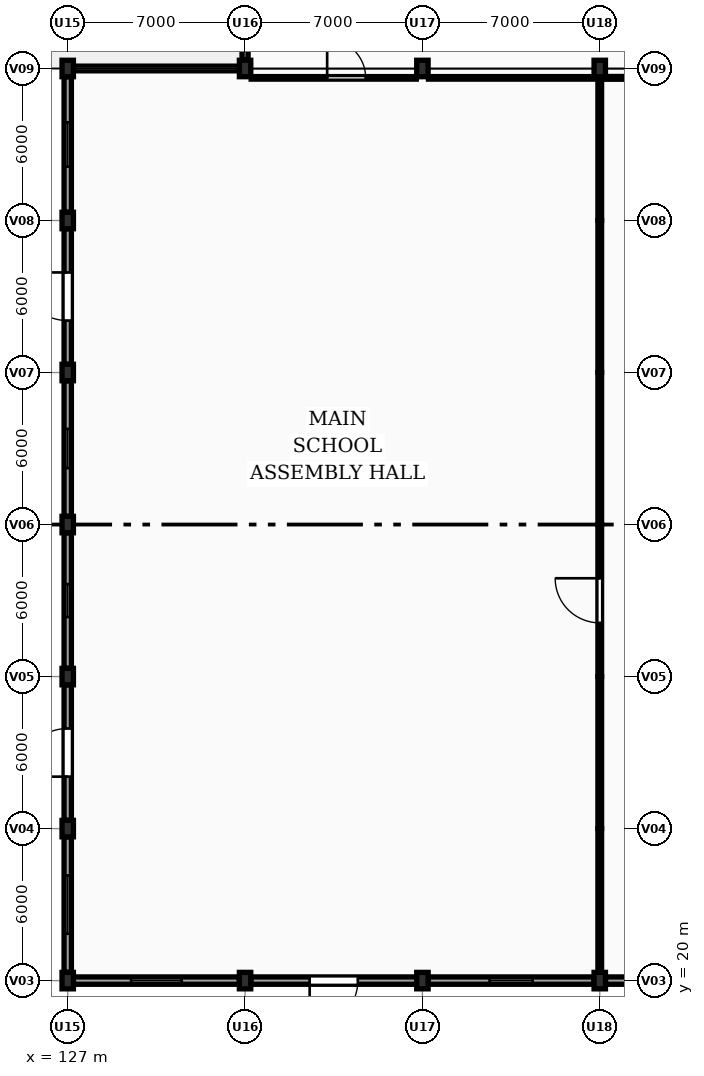
"""IFC4 building model, lengths in metres.
Left out: names, types, materials, properties, quantities, classifications, styles, units other than length and angle.
Written with IfcOpenShell. Run it as: python <this file> out.ifc"""

import sys

from ifc_helpers import new_model, si_unit, direction, frame, frame_2d, origin, origin_2d, place, context, subcontext, project, spatial, rectangle, extrude, element, fill, save


model = new_model("IFC4")
c1 = context("Model", 3, precision=1e-05, world=origin(), true_north=direction((0.0, 1.0)))
c2 = subcontext(c1, "Body", "Model", "MODEL_VIEW")
j1 = project(units=[si_unit("LENGTHUNIT", "METRE"), si_unit("PLANEANGLEUNIT", "RADIAN")], contexts=[c1])
p1 = place(None, origin())
s1 = spatial("IfcSite", under=j1, at=p1, CompositionType="ELEMENT")
p2 = place(p1, origin())
s2 = spatial("IfcBuilding", under=s1, at=p2, CompositionType="ELEMENT")
p3 = place(p2, origin())
s3 = spatial("IfcBuildingStorey", under=s2, at=p3, CompositionType="ELEMENT", Elevation=0.0)
for number, where, z_axis, x_axis in (
    (1, (127.0, 20.0, -0.2), (0.0, 0.0, 1.0), (1.0, 0.0, 0.0)),
    (2, (127.0, 26.0, -0.2), (0.0, 0.0, 1.0), (1.0, 0.0, 0.0)),
    (3, (127.0, 32.0, -0.2), (0.0, 0.0, 1.0), (1.0, 0.0, 0.0)),
    (4, (127.0, 38.0, -0.2), (0.0, 0.0, 1.0), (1.0, 0.0, 0.0)),
    (5, (127.0, 44.0, -0.2), (0.0, 0.0, 1.0), (1.0, 0.0, 0.0)),
    (6, (127.0, 50.0, -0.2), (0.0, 0.0, 1.0), (1.0, 0.0, 0.0)),
    (7, (127.0, 56.0, -0.2), (0.0, 0.0, 1.0), (1.0, 0.0, 0.0)),
    (8, (134.0, 20.0, -0.2), (0.0, 0.0, 1.0), (1.0, 0.0, 0.0)),
    (9, (134.0, 56.0, -0.2), (0.0, 0.0, 1.0), (1.0, 0.0, 0.0)),
    (10, (141.0, 20.0, -0.2), (0.0, 0.0, 1.0), (1.0, 0.0, 0.0)),
    (11, (141.0, 56.0, -0.2), (0.0, 0.0, 1.0), (1.0, 0.0, 0.0)),
    (12, (148.0, 20.0, -0.2), (0.0, 0.0, 1.0), (1.0, 0.0, 0.0)),
    (13, (148.0, 56.0, -0.2), (0.0, 0.0, 1.0), (1.0, 0.0, 0.0)),
):
    element("IfcColumn", number, at=place(p3, frame(where, z_axis=z_axis, x_axis=x_axis)), inside=s3, PredefinedType="COLUMN", context=c2, shape_type="SweptSolid", body=[
        extrude(rectangle(XDim=0.45, YDim=0.65, at=origin_2d()), origin(), (0.0, 0.0, 1.0), 4.7),
    ])
p4 = place(p3, frame((154.775, 20.0, 0.0), z_axis=(0.0, 0.0, 1.0), x_axis=(-1.0, 0.0, 0.0)))
e14 = element("IfcWall", 14, at=p4, inside=s3, PredefinedType="SOLIDWALL", context=c2, shape_type="SweptSolid", body=[
    extrude(rectangle(XDim=6.55, YDim=0.29, at=frame_2d((3.275, 0.0))), origin(), (0.0, 0.0, 1.0), 3.54),
])
p5 = place(p4, frame((2.575, 0.0, 0.95)))
e15 = element("IfcOpeningElement", 15, at=p5, cuts=e14, PredefinedType="OPENING", context=c2, shape_type="SweptSolid", body=[
    extrude(rectangle(XDim=1.4, YDim=1.8, at=frame_2d((0.7, 0.9))), frame((0.0, 0.155, 0.0), z_axis=(0.0, -1.0, 0.0), x_axis=(1.0, 0.0, 0.0)), (0.0, 0.0, 1.0), 0.31),
])
p6 = place(p3, frame((147.775, 20.0, 0.0), z_axis=(0.0, 0.0, 1.0), x_axis=(-1.0, 0.0, 0.0)))
e16 = element("IfcWall", 16, at=p6, inside=s3, PredefinedType="SOLIDWALL", context=c2, shape_type="SweptSolid", body=[
    extrude(rectangle(XDim=6.55, YDim=0.29, at=frame_2d((3.275, 0.0))), origin(), (0.0, 0.0, 1.0), 3.54),
])
p7 = place(p6, frame((2.425, 0.0, 0.95)))
e17 = element("IfcOpeningElement", 17, at=p7, cuts=e16, PredefinedType="OPENING", context=c2, shape_type="SweptSolid", body=[
    extrude(rectangle(XDim=1.7, YDim=1.8, at=frame_2d((0.85, 0.9))), frame((0.0, 0.155, 0.0), z_axis=(0.0, -1.0, 0.0), x_axis=(1.0, 0.0, 0.0)), (0.0, 0.0, 1.0), 0.31),
])
p8 = place(p3, frame((140.775, 20.0, 0.0), z_axis=(0.0, 0.0, 1.0), x_axis=(-1.0, 0.0, 0.0)))
e18 = element("IfcWall", 18, at=p8, inside=s3, PredefinedType="SOLIDWALL", context=c2, shape_type="SweptSolid", body=[
    extrude(rectangle(XDim=6.55, YDim=0.29, at=frame_2d((3.275, 0.0))), origin(), (0.0, 0.0, 1.0), 3.54),
])
p9 = place(p8, frame((2.325, 0.0, 0.0)))
e19 = element("IfcOpeningElement", 19, at=p9, cuts=e18, PredefinedType="OPENING", context=c2, shape_type="SweptSolid", body=[
    extrude(rectangle(XDim=1.9, YDim=2.25, at=frame_2d((0.95, 1.125))), frame((0.0, 0.155, 0.0), z_axis=(0.0, -1.0, 0.0), x_axis=(1.0, 0.0, 0.0)), (0.0, 0.0, 1.0), 0.31),
])
p10 = place(p3, frame((133.775, 20.0, 0.0), z_axis=(0.0, 0.0, 1.0), x_axis=(-1.0, 0.0, 0.0)))
e20 = element("IfcWall", 20, at=p10, inside=s3, PredefinedType="SOLIDWALL", context=c2, shape_type="SweptSolid", body=[
    extrude(rectangle(XDim=6.55, YDim=0.29, at=frame_2d((3.275, 0.0))), origin(), (0.0, 0.0, 1.0), 3.54),
])
p11 = place(p10, frame((2.275, 0.0, 0.95)))
e21 = element("IfcOpeningElement", 21, at=p11, cuts=e20, PredefinedType="OPENING", context=c2, shape_type="SweptSolid", body=[
    extrude(rectangle(XDim=2.0, YDim=1.8, at=frame_2d((1.0, 0.9))), frame((0.0, 0.155, 0.0), z_axis=(0.0, -1.0, 0.0), x_axis=(1.0, 0.0, 0.0)), (0.0, 0.0, 1.0), 0.31),
])
p12 = place(p3, frame((127.0, 20.325, 0.0), z_axis=(0.0, 0.0, 1.0), x_axis=(0.0, 1.0, 0.0)))
e22 = element("IfcWall", 22, at=p12, inside=s3, PredefinedType="SOLIDWALL", context=c2, shape_type="SweptSolid", body=[
    extrude(rectangle(XDim=5.35, YDim=0.29, at=frame_2d((2.675, 0.0))), origin(), (0.0, 0.0, 1.0), 3.54),
])
p13 = place(p12, frame((1.525, 0.0, 0.95)))
e23 = element("IfcOpeningElement", 23, at=p13, cuts=e22, PredefinedType="OPENING", context=c2, shape_type="SweptSolid", body=[
    extrude(rectangle(XDim=2.3, YDim=1.8, at=frame_2d((1.15, 0.9))), frame((0.0, 0.155, 0.0), z_axis=(0.0, -1.0, 0.0), x_axis=(1.0, 0.0, 0.0)), (0.0, 0.0, 1.0), 0.31),
])
p14 = place(p3, frame((127.0, 26.325, 0.0), z_axis=(0.0, 0.0, 1.0), x_axis=(0.0, 1.0, 0.0)))
e24 = element("IfcWall", 24, at=p14, inside=s3, PredefinedType="SOLIDWALL", context=c2, shape_type="SweptSolid", body=[
    extrude(rectangle(XDim=5.35, YDim=0.29, at=frame_2d((2.675, 0.0))), origin(), (0.0, 0.0, 1.0), 3.54),
])
p15 = place(p14, frame((1.725, 0.0, 0.0)))
e25 = element("IfcOpeningElement", 25, at=p15, cuts=e24, PredefinedType="OPENING", context=c2, shape_type="SweptSolid", body=[
    extrude(rectangle(XDim=1.9, YDim=2.25, at=frame_2d((0.95, 1.125))), frame((0.0, 0.155, 0.0), z_axis=(0.0, -1.0, 0.0), x_axis=(1.0, 0.0, 0.0)), (0.0, 0.0, 1.0), 0.31),
])
p16 = place(p3, frame((127.0, 32.325, 0.0), z_axis=(0.0, 0.0, 1.0), x_axis=(0.0, 1.0, 0.0)))
e26 = element("IfcWall", 26, at=p16, inside=s3, PredefinedType="SOLIDWALL", context=c2, shape_type="SweptSolid", body=[
    extrude(rectangle(XDim=5.35, YDim=0.29, at=frame_2d((2.675, 0.0))), origin(), (0.0, 0.0, 1.0), 3.54),
])
p17 = place(p16, frame((2.025, 0.0, 0.95)))
e27 = element("IfcOpeningElement", 27, at=p17, cuts=e26, PredefinedType="OPENING", context=c2, shape_type="SweptSolid", body=[
    extrude(rectangle(XDim=1.3, YDim=1.4, at=frame_2d((0.65, 0.7))), frame((0.0, 0.155, 0.0), z_axis=(0.0, -1.0, 0.0), x_axis=(1.0, 0.0, 0.0)), (0.0, 0.0, 1.0), 0.31),
])
p18 = place(p3, frame((127.0, 38.325, 0.0), z_axis=(0.0, 0.0, 1.0), x_axis=(0.0, 1.0, 0.0)))
e28 = element("IfcWall", 28, at=p18, inside=s3, PredefinedType="SOLIDWALL", context=c2, shape_type="SweptSolid", body=[
    extrude(rectangle(XDim=5.35, YDim=0.29, at=frame_2d((2.675, 0.0))), origin(), (0.0, 0.0, 1.0), 3.54),
])
p19 = place(p18, frame((1.9, 0.0, 0.95)))
e29 = element("IfcOpeningElement", 29, at=p19, cuts=e28, PredefinedType="OPENING", context=c2, shape_type="SweptSolid", body=[
    extrude(rectangle(XDim=1.55, YDim=1.4, at=frame_2d((0.775, 0.7))), frame((0.0, 0.155, 0.0), z_axis=(0.0, -1.0, 0.0), x_axis=(1.0, 0.0, 0.0)), (0.0, 0.0, 1.0), 0.31),
])
p20 = place(p3, frame((127.0, 44.325, 0.0), z_axis=(0.0, 0.0, 1.0), x_axis=(0.0, 1.0, 0.0)))
e30 = element("IfcWall", 30, at=p20, inside=s3, PredefinedType="SOLIDWALL", context=c2, shape_type="SweptSolid", body=[
    extrude(rectangle(XDim=5.35, YDim=0.29, at=frame_2d((2.675, 0.0))), origin(), (0.0, 0.0, 1.0), 3.54),
])
p21 = place(p20, frame((1.725, 0.0, 0.0)))
e31 = element("IfcOpeningElement", 31, at=p21, cuts=e30, PredefinedType="OPENING", context=c2, shape_type="SweptSolid", body=[
    extrude(rectangle(XDim=1.9, YDim=2.25, at=frame_2d((0.95, 1.125))), frame((0.0, 0.155, 0.0), z_axis=(0.0, -1.0, 0.0), x_axis=(1.0, 0.0, 0.0)), (0.0, 0.0, 1.0), 0.31),
])
p22 = place(p3, frame((127.0, 50.325, 0.0), z_axis=(0.0, 0.0, 1.0), x_axis=(0.0, 1.0, 0.0)))
e32 = element("IfcWall", 32, at=p22, inside=s3, PredefinedType="SOLIDWALL", context=c2, shape_type="SweptSolid", body=[
    extrude(rectangle(XDim=5.35, YDim=0.29, at=frame_2d((2.675, 0.0))), origin(), (0.0, 0.0, 1.0), 3.54),
])
p23 = place(p22, frame((1.8, 0.0, 0.95)))
e33 = element("IfcOpeningElement", 33, at=p23, cuts=e32, PredefinedType="OPENING", context=c2, shape_type="SweptSolid", body=[
    extrude(rectangle(XDim=1.75, YDim=1.4, at=frame_2d((0.875, 0.7))), frame((0.0, 0.155, 0.0), z_axis=(0.0, -1.0, 0.0), x_axis=(1.0, 0.0, 0.0)), (0.0, 0.0, 1.0), 0.31),
])
p24 = place(p3, frame((127.225, 56.0, 0.0), z_axis=(0.0, 0.0, 1.0), x_axis=(1.0, 0.0, 0.0)))
e34 = element("IfcWall", 34, at=p24, inside=s3, PredefinedType="SOLIDWALL", context=c2, shape_type="SweptSolid", body=[
    extrude(rectangle(XDim=6.55, YDim=0.185, at=frame_2d((3.275, 0.0))), origin(), (0.0, 0.0, 1.0), 0.95),
])
p25 = place(p3, frame((134.0, 56.325, 0.0), z_axis=(0.0, 0.0, 1.0), x_axis=(0.0, 1.0, 0.0)))
e35 = element("IfcWall", 35, at=p25, inside=s3, PredefinedType="SOLIDWALL", context=c2, shape_type="SweptSolid", body=[
    extrude(rectangle(XDim=7.425, YDim=0.24, at=frame_2d((3.712, 0.0))), origin(), (0.0, 0.0, 1.0), 3.565),
])
p26 = place(p25, frame((2.812, 0.0, 0.0)))
e36 = element("IfcOpeningElement", 36, at=p26, cuts=e35, PredefinedType="OPENING", context=c2, shape_type="SweptSolid", body=[
    extrude(rectangle(XDim=1.8, YDim=2.2, at=frame_2d((0.9, 1.1))), frame((0.0, 0.13, 0.0), z_axis=(0.0, -1.0, 0.0), x_axis=(1.0, 0.0, 0.0)), (0.0, 0.0, 1.0), 0.26),
])
p27 = place(p3, frame((148.0, 20.34, 0.0), z_axis=(0.0, 0.0, 1.0), x_axis=(0.0, 1.0, 0.0)))
e37 = element("IfcWall", 37, at=p27, inside=s3, PredefinedType="MOVABLE", context=c2, shape_type="SweptSolid", body=[
    extrude(rectangle(XDim=5.66, YDim=0.145, at=frame_2d((2.83, 0.0))), origin(), (0.0, 0.0, 1.0), 8.8),
])
p28 = place(p3, frame((148.0, 26.0, 0.0), z_axis=(0.0, 0.0, 1.0), x_axis=(0.0, 1.0, 0.0)))
e38 = element("IfcWall", 38, at=p28, inside=s3, PredefinedType="MOVABLE", context=c2, shape_type="SweptSolid", body=[
    extrude(rectangle(XDim=6.0, YDim=0.145, at=frame_2d((3.0, 0.0))), origin(), (0.0, 0.0, 1.0), 8.8),
])
p29 = place(p3, frame((148.0, 32.0, 0.0), z_axis=(0.0, 0.0, 1.0), x_axis=(0.0, 1.0, 0.0)))
e39 = element("IfcWall", 39, at=p29, inside=s3, PredefinedType="MOVABLE", context=c2, shape_type="SweptSolid", body=[
    extrude(rectangle(XDim=6.0, YDim=0.145, at=frame_2d((3.0, 0.0))), origin(), (0.0, 0.0, 1.0), 8.8),
])
p30 = place(p29, frame((2.12, 0.0, 0.0)))
e40 = element("IfcOpeningElement", 40, at=p30, cuts=e39, PredefinedType="OPENING", context=c2, shape_type="SweptSolid", body=[
    extrude(rectangle(XDim=1.76, YDim=2.2, at=frame_2d((0.88, 1.1))), frame((0.0, 0.083, 0.0), z_axis=(0.0, -1.0, 0.0), x_axis=(1.0, 0.0, 0.0)), (0.0, 0.0, 1.0), 0.165),
])
for number, where, z_axis, x_axis in (
    (41, (148.0, 38.0, 0.0), (0.0, 0.0, 1.0), (0.0, 1.0, 0.0)),
    (42, (148.0, 44.0, 0.0), (0.0, 0.0, 1.0), (0.0, 1.0, 0.0)),
):
    element("IfcWall", number, at=place(p3, frame(where, z_axis=z_axis, x_axis=x_axis)), inside=s3, PredefinedType="MOVABLE", context=c2, shape_type="SweptSolid", body=[
        extrude(rectangle(XDim=6.0, YDim=0.145, at=frame_2d((3.0, 0.0))), origin(), (0.0, 0.0, 1.0), 8.8),
    ])
p31 = place(p3, frame((148.0, 50.0, 0.0), z_axis=(0.0, 0.0, 1.0), x_axis=(0.0, 1.0, 0.0)))
e43 = element("IfcWall", 43, at=p31, inside=s3, PredefinedType="MOVABLE", context=c2, shape_type="SweptSolid", body=[
    extrude(rectangle(XDim=5.66, YDim=0.145, at=frame_2d((2.83, 0.0))), origin(), (0.0, 0.0, 1.0), 8.8),
])
p32 = place(p3, frame((134.24, 55.63, 0.0), z_axis=(0.0, 0.0, 1.0), x_axis=(1.0, 0.0, 0.0)))
e44 = element("IfcWall", 44, at=p32, inside=s3, PredefinedType="PARTITIONING", context=c2, shape_type="SweptSolid", body=[
    extrude(rectangle(XDim=6.52, YDim=0.1, at=frame_2d((3.26, 0.0))), origin(), (0.0, 0.0, 1.0), 3.565),
])
p33 = place(p32, frame((3.0, 0.0, 0.0)))
e45 = element("IfcOpeningElement", 45, at=p33, cuts=e44, PredefinedType="OPENING", context=c2, shape_type="SweptSolid", body=[
    extrude(rectangle(XDim=1.52, YDim=2.2, at=frame_2d((0.76, 1.1))), frame((0.0, 0.06, 0.0), z_axis=(0.0, -1.0, 0.0), x_axis=(1.0, 0.0, 0.0)), (0.0, 0.0, 1.0), 0.12),
])
p34 = place(p3, frame((141.24, 55.63, 0.0), z_axis=(0.0, 0.0, 1.0), x_axis=(1.0, 0.0, 0.0)))
e46 = element("IfcWall", 46, at=p34, inside=s3, PredefinedType="PARTITIONING", context=c2, shape_type="SweptSolid", body=[
    extrude(rectangle(XDim=6.52, YDim=0.1, at=frame_2d((3.26, 0.0))), origin(), (0.0, 0.0, 1.0), 3.565),
])
p35 = place(p3, frame((148.24, 55.63, 0.0), z_axis=(0.0, 0.0, 1.0), x_axis=(1.0, 0.0, 0.0)))
e47 = element("IfcWall", 47, at=p35, inside=s3, PredefinedType="PARTITIONING", context=c2, shape_type="SweptSolid", body=[
    extrude(rectangle(XDim=6.52, YDim=0.11, at=frame_2d((3.26, 0.0))), origin(), (0.0, 0.0, 1.0), 3.565),
])
p36 = place(p7, origin())
e48 = element("IfcWindow", 48, at=p36, inside=s3, PartitioningType="DOUBLE_PANEL_VERTICAL", PredefinedType="WINDOW", context=c2, shape_type="SweptSolid", body=[
    extrude(rectangle(XDim=1.7, YDim=1.8, at=frame_2d((0.85, 0.9))), frame((0.0, 0.03, 0.0), z_axis=(0.0, -1.0, 0.0), x_axis=(1.0, 0.0, 0.0)), (0.0, 0.0, 1.0), 0.06),
])
fill(e17, e48)
p37 = place(p9, origin())
e49 = element("IfcDoor", 49, at=p37, inside=s3, OperationType="SINGLE_SWING_RIGHT", PredefinedType="DOOR", context=c2, shape_type="SweptSolid", body=[
    extrude(rectangle(XDim=1.9, YDim=2.25, at=frame_2d((0.95, 1.125))), frame((0.0, 0.025, 0.0), z_axis=(0.0, -1.0, 0.0), x_axis=(1.0, 0.0, 0.0)), (0.0, 0.0, 1.0), 0.05),
])
fill(e19, e49)
p38 = place(p11, origin())
e50 = element("IfcWindow", 50, at=p38, inside=s3, PartitioningType="DOUBLE_PANEL_VERTICAL", PredefinedType="WINDOW", context=c2, shape_type="SweptSolid", body=[
    extrude(rectangle(XDim=2.0, YDim=1.8, at=frame_2d((1.0, 0.9))), frame((0.0, 0.03, 0.0), z_axis=(0.0, -1.0, 0.0), x_axis=(1.0, 0.0, 0.0)), (0.0, 0.0, 1.0), 0.06),
])
fill(e21, e50)
p39 = place(p13, origin())
e51 = element("IfcWindow", 51, at=p39, inside=s3, PartitioningType="DOUBLE_PANEL_VERTICAL", PredefinedType="WINDOW", context=c2, shape_type="SweptSolid", body=[
    extrude(rectangle(XDim=2.3, YDim=1.8, at=frame_2d((1.15, 0.9))), frame((0.0, 0.03, 0.0), z_axis=(0.0, -1.0, 0.0), x_axis=(1.0, 0.0, 0.0)), (0.0, 0.0, 1.0), 0.06),
])
fill(e23, e51)
p40 = place(p15, origin())
e52 = element("IfcDoor", 52, at=p40, inside=s3, OperationType="SINGLE_SWING_LEFT", PredefinedType="DOOR", context=c2, shape_type="SweptSolid", body=[
    extrude(rectangle(XDim=1.9, YDim=2.25, at=frame_2d((0.95, 1.125))), frame((0.0, 0.025, 0.0), z_axis=(0.0, -1.0, 0.0), x_axis=(1.0, 0.0, 0.0)), (0.0, 0.0, 1.0), 0.05),
])
fill(e25, e52)
p41 = place(p17, origin())
e53 = element("IfcWindow", 53, at=p41, inside=s3, PartitioningType="SINGLE_PANEL", PredefinedType="WINDOW", context=c2, shape_type="SweptSolid", body=[
    extrude(rectangle(XDim=1.3, YDim=1.4, at=frame_2d((0.65, 0.7))), frame((0.0, 0.03, 0.0), z_axis=(0.0, -1.0, 0.0), x_axis=(1.0, 0.0, 0.0)), (0.0, 0.0, 1.0), 0.06),
])
fill(e27, e53)
p42 = place(p19, origin())
e54 = element("IfcWindow", 54, at=p42, inside=s3, PartitioningType="SINGLE_PANEL", PredefinedType="WINDOW", context=c2, shape_type="SweptSolid", body=[
    extrude(rectangle(XDim=1.55, YDim=1.4, at=frame_2d((0.775, 0.7))), frame((0.0, 0.03, 0.0), z_axis=(0.0, -1.0, 0.0), x_axis=(1.0, 0.0, 0.0)), (0.0, 0.0, 1.0), 0.06),
])
fill(e29, e54)
p43 = place(p21, origin())
e55 = element("IfcDoor", 55, at=p43, inside=s3, OperationType="SINGLE_SWING_RIGHT", PredefinedType="DOOR", context=c2, shape_type="SweptSolid", body=[
    extrude(rectangle(XDim=1.9, YDim=2.25, at=frame_2d((0.95, 1.125))), frame((0.0, 0.025, 0.0), z_axis=(0.0, -1.0, 0.0), x_axis=(1.0, 0.0, 0.0)), (0.0, 0.0, 1.0), 0.05),
])
fill(e31, e55)
p44 = place(p23, origin())
e56 = element("IfcWindow", 56, at=p44, inside=s3, PartitioningType="DOUBLE_PANEL_VERTICAL", PredefinedType="WINDOW", context=c2, shape_type="SweptSolid", body=[
    extrude(rectangle(XDim=1.75, YDim=1.4, at=frame_2d((0.875, 0.7))), frame((0.0, 0.03, 0.0), z_axis=(0.0, -1.0, 0.0), x_axis=(1.0, 0.0, 0.0)), (0.0, 0.0, 1.0), 0.06),
])
fill(e33, e56)
p45 = place(p30, origin())
e57 = element("IfcDoor", 57, at=p45, inside=s3, OperationType="SINGLE_SWING_RIGHT", PredefinedType="DOOR", context=c2, shape_type="SweptSolid", body=[
    extrude(rectangle(XDim=1.76, YDim=2.2, at=frame_2d((0.88, 1.1))), frame((0.0, 0.025, 0.0), z_axis=(0.0, -1.0, 0.0), x_axis=(1.0, 0.0, 0.0)), (0.0, 0.0, 1.0), 0.05),
])
fill(e40, e57)
p46 = place(p33, origin())
e58 = element("IfcDoor", 58, at=p46, inside=s3, OperationType="SINGLE_SWING_LEFT", PredefinedType="DOOR", context=c2, shape_type="SweptSolid", body=[
    extrude(rectangle(XDim=1.52, YDim=2.2, at=frame_2d((0.76, 1.1))), frame((0.0, 0.025, 0.0), z_axis=(0.0, -1.0, 0.0), x_axis=(1.0, 0.0, 0.0)), (0.0, 0.0, 1.0), 0.05),
])
fill(e45, e58)
save(model, sys.argv[1])
